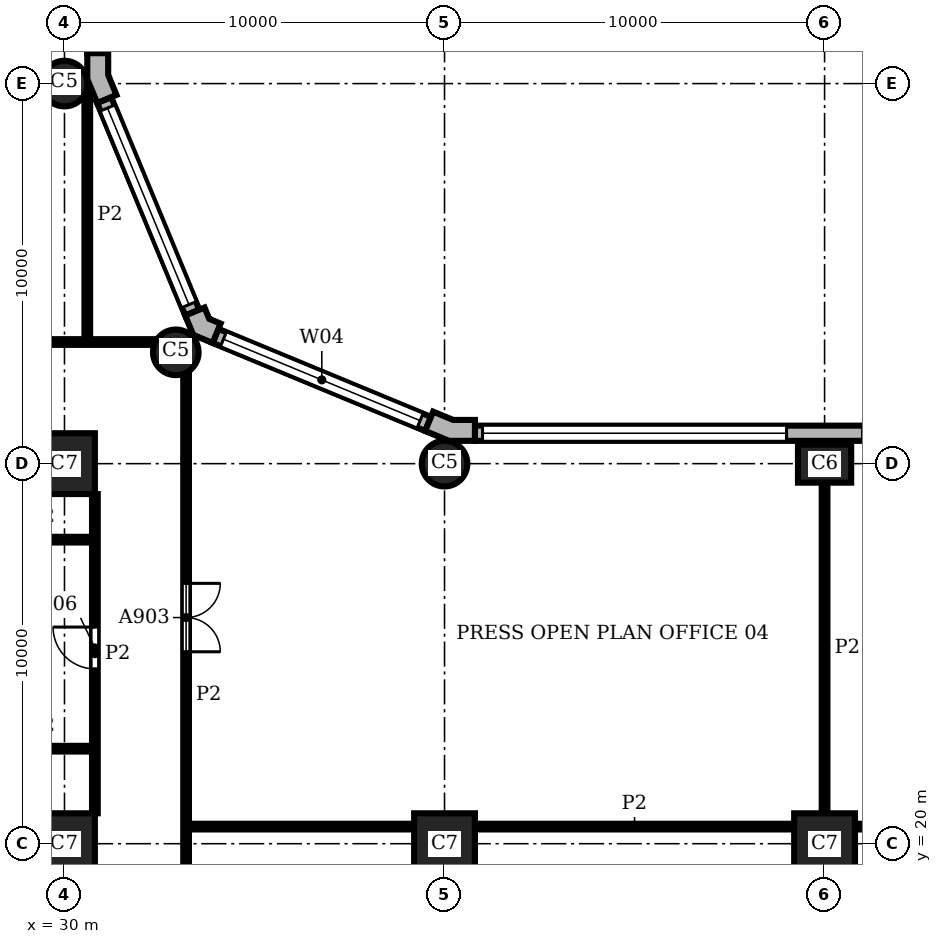
"""IFC4 building model, lengths in metres.
Left out: names, types, materials, properties, quantities, classifications, styles, units other than length and angle.
Written with IfcOpenShell. Run it as: python <this file> out.ifc"""

import sys

from ifc_helpers import new_model, si_unit, direction, frame, frame_2d, origin, origin_2d, place, context, subcontext, project, spatial, polyline, rectangle, circle, outline, extrude, element, fill, save


model = new_model("IFC4")
c1 = context("Model", 3, precision=1e-05, world=origin(), true_north=direction((0.0, 1.0)))
c2 = subcontext(c1, "Body", "Model", "MODEL_VIEW")
j1 = project(units=[si_unit("LENGTHUNIT", "METRE"), si_unit("PLANEANGLEUNIT", "RADIAN")], contexts=[c1])
p1 = place(None, origin())
s1 = spatial("IfcSite", under=j1, at=p1, CompositionType="ELEMENT")
p2 = place(p1, origin())
s2 = spatial("IfcBuilding", under=s1, at=p2, CompositionType="ELEMENT")
p3 = place(p2, frame((0.0, 0.0, 113.4)))
s3 = spatial("IfcBuildingStorey", under=s2, at=p3, CompositionType="ELEMENT", Elevation=113.4)
p4 = place(p3, frame((50.0, 30.0, 0.0), z_axis=(0.0, 0.0, 1.0), x_axis=(1.0, 0.0, 0.0)))
e1 = element("IfcColumn", 1, at=p4, inside=s3, PredefinedType="COLUMN", context=c2, shape_type="SweptSolid", body=[
    extrude(rectangle(XDim=1.4, YDim=1.0, at=origin_2d()), origin(), (0.0, 0.0, 1.0), 3.9),
])
for number, where, z_axis, x_axis in (
    (2, (40.0, 30.0, 0.0), (0.0, 0.0, 1.0), (1.0, 0.0, 0.0)),
    (3, (32.929, 32.929, 0.0), (0.0, 0.0, 1.0), (1.0, 0.0, 0.0)),
    (4, (30.0, 40.0, 0.0), (0.0, 0.0, 1.0), (1.0, 0.0, 0.0)),
):
    element("IfcColumn", number, at=place(p3, frame(where, z_axis=z_axis, x_axis=x_axis)), inside=s3, PredefinedType="COLUMN", context=c2, shape_type="SweptSolid", body=[
        extrude(circle(Radius=0.6, at=origin_2d()), origin(), (0.0, 0.0, 1.0), 3.9),
    ])
for number, where, z_axis, x_axis in (
    (5, (30.0, 20.0, 0.0), (0.0, 0.0, 1.0), (1.0, 0.0, 0.0)),
    (6, (30.0, 30.0, 0.0), (0.0, 0.0, 1.0), (1.0, 0.0, 0.0)),
    (7, (40.0, 20.0, 0.0), (0.0, 0.0, 1.0), (1.0, 0.0, 0.0)),
    (8, (50.0, 20.0, 0.0), (0.0, 0.0, 1.0), (1.0, 0.0, 0.0)),
):
    element("IfcColumn", number, at=place(p3, frame(where, z_axis=z_axis, x_axis=x_axis)), inside=s3, PredefinedType="COLUMN", context=c2, shape_type="SweptSolid", body=[
        extrude(rectangle(XDim=1.6, YDim=1.6, at=origin_2d()), origin(), (0.0, 0.0, 1.0), 3.9),
    ])
p5 = place(p3, origin())
e9 = element("IfcWall", 9, at=p5, inside=s3, PredefinedType="SOLIDWALL", context=c2, shape_type="SweptSolid", body=[
    extrude(outline(polyline([(40.8, 31.0), (40.8, 31.15), (40.229, 31.15), (39.701, 31.369), (39.644, 31.23), (39.49, 30.861), (40.119, 30.6), (40.8, 30.6), (40.8, 31.0)])), origin(), (0.0, 0.0, 1.0), 3.9),
])
e10 = element("IfcWall", 10, at=p5, inside=s3, PredefinedType="SOLIDWALL", context=c2, shape_type="SweptSolid", body=[
    extrude(outline(polyline([(34.051, 33.547), (34.108, 33.685), (33.809, 33.809), (33.685, 34.108), (33.547, 34.051), (33.177, 33.898), (33.388, 33.388), (33.898, 33.177), (34.051, 33.547)])), origin(), (0.0, 0.0, 1.0), 3.9),
])
e11 = element("IfcWall", 11, at=p5, inside=s3, PredefinedType="SOLIDWALL", context=c2, shape_type="SweptSolid", body=[
    extrude(outline(polyline([(31.23, 39.644), (31.369, 39.701), (31.15, 40.229), (31.15, 40.8), (31.0, 40.8), (30.6, 40.8), (30.6, 40.119), (30.861, 39.49), (31.23, 39.644)])), origin(), (0.0, 0.0, 1.0), 3.9),
])
p6 = place(p3, frame((69.2, 30.8, 0.0), z_axis=(0.0, 0.0, 1.0), x_axis=(-1.0, 0.0, 0.0)))
e12 = element("IfcWall", 12, at=p6, inside=s3, PredefinedType="SOLIDWALL", context=c2, shape_type="SweptSolid", body=[
    extrude(rectangle(XDim=28.4, YDim=0.4, at=frame_2d((14.2, 0.0))), origin(), (0.0, 0.0, 1.0), 3.9),
])
p7 = place(p6, frame((0.2, 0.0, 0.9)))
e13 = element("IfcOpeningElement", 13, at=p7, cuts=e12, PredefinedType="OPENING", context=c2, shape_type="SweptSolid", body=[
    extrude(rectangle(XDim=8.0, YDim=2.35, at=frame_2d((4.0, 1.175))), frame((0.0, 0.21, 0.0), z_axis=(0.0, -1.0, 0.0), x_axis=(1.0, 0.0, 0.0)), (0.0, 0.0, 1.0), 0.42),
])
p8 = place(p6, frame((10.2, 0.0, 0.9)))
e14 = element("IfcOpeningElement", 14, at=p8, cuts=e12, PredefinedType="OPENING", context=c2, shape_type="SweptSolid", body=[
    extrude(rectangle(XDim=8.0, YDim=2.35, at=frame_2d((4.0, 1.175))), frame((0.0, 0.21, 0.0), z_axis=(0.0, -1.0, 0.0), x_axis=(1.0, 0.0, 0.0)), (0.0, 0.0, 1.0), 0.42),
])
p9 = place(p6, frame((20.2, 0.0, 0.9)))
e15 = element("IfcOpeningElement", 15, at=p9, cuts=e12, PredefinedType="OPENING", context=c2, shape_type="SweptSolid", body=[
    extrude(rectangle(XDim=8.0, YDim=2.35, at=frame_2d((4.0, 1.175))), frame((0.0, 0.21, 0.0), z_axis=(0.0, -1.0, 0.0), x_axis=(1.0, 0.0, 0.0)), (0.0, 0.0, 1.0), 0.42),
])
p10 = place(p3, frame((39.567, 31.045, 0.0), z_axis=(0.0, 0.0, 1.0), x_axis=(-0.923891000409, 0.382655745237, 0.0)))
e16 = element("IfcWall", 16, at=p10, inside=s3, PredefinedType="SOLIDWALL", context=c2, shape_type="SweptSolid", body=[
    extrude(rectangle(XDim=6.053, YDim=0.4, at=frame_2d((3.027, 0.0))), origin(), (0.0, 0.0, 1.0), 3.9),
])
p11 = place(p10, frame((0.227, 0.0, 0.9)))
e17 = element("IfcOpeningElement", 17, at=p11, cuts=e16, PredefinedType="OPENING", context=c2, shape_type="SweptSolid", body=[
    extrude(rectangle(XDim=5.6, YDim=2.35, at=frame_2d((2.8, 1.175))), frame((0.0, 0.21, 0.0), z_axis=(0.0, -1.0, 0.0), x_axis=(1.0, 0.0, 0.0)), (0.0, 0.0, 1.0), 0.42),
])
p12 = place(p3, frame((33.362, 33.974, 0.0), z_axis=(0.0, 0.0, 1.0), x_axis=(-0.382655745237, 0.923891000409, 0.0)))
e18 = element("IfcWall", 18, at=p12, inside=s3, PredefinedType="SOLIDWALL", context=c2, shape_type="SweptSolid", body=[
    extrude(rectangle(XDim=6.053, YDim=0.4, at=frame_2d((3.027, 0.0))), origin(), (0.0, 0.0, 1.0), 3.9),
])
p13 = place(p12, frame((0.227, 0.0, 0.9)))
e19 = element("IfcOpeningElement", 19, at=p13, cuts=e18, PredefinedType="OPENING", context=c2, shape_type="SweptSolid", body=[
    extrude(rectangle(XDim=5.6, YDim=2.35, at=frame_2d((2.8, 1.175))), frame((0.0, 0.21, 0.0), z_axis=(0.0, -1.0, 0.0), x_axis=(1.0, 0.0, 0.0)), (0.0, 0.0, 1.0), 0.42),
])
p14 = place(p3, frame((30.8, 40.8, 0.0), z_axis=(0.0, 0.0, 1.0), x_axis=(0.0, 1.0, 0.0)))
e20 = element("IfcWall", 20, at=p14, inside=s3, PredefinedType="SOLIDWALL", context=c2, shape_type="SweptSolid", body=[
    extrude(rectangle(XDim=18.4, YDim=0.4, at=frame_2d((9.2, 0.0))), origin(), (0.0, 0.0, 1.0), 3.9),
])
p15 = place(p14, frame((0.2, 0.0, 0.9)))
e21 = element("IfcOpeningElement", 21, at=p15, cuts=e20, PredefinedType="OPENING", context=c2, shape_type="SweptSolid", body=[
    extrude(rectangle(XDim=8.0, YDim=2.35, at=frame_2d((4.0, 1.175))), frame((0.0, 0.21, 0.0), z_axis=(0.0, -1.0, 0.0), x_axis=(1.0, 0.0, 0.0)), (0.0, 0.0, 1.0), 0.42),
])
p16 = place(p14, frame((10.2, 0.0, 0.9)))
e22 = element("IfcOpeningElement", 22, at=p16, cuts=e20, PredefinedType="OPENING", context=c2, shape_type="SweptSolid", body=[
    extrude(rectangle(XDim=8.0, YDim=2.35, at=frame_2d((4.0, 1.175))), frame((0.0, 0.21, 0.0), z_axis=(0.0, -1.0, 0.0), x_axis=(1.0, 0.0, 0.0)), (0.0, 0.0, 1.0), 0.42),
])
p17 = place(p3, frame((30.6, 33.2, 0.0), z_axis=(0.0, 0.0, 1.0), x_axis=(0.0, 1.0, 0.0)))
e23 = element("IfcWall", 23, at=p17, inside=s3, PredefinedType="PARTITIONING", context=c2, shape_type="SweptSolid", body=[
    extrude(rectangle(XDim=6.699, YDim=0.15, at=frame_2d((3.35, 0.0))), origin(), (0.0, 0.0, 1.0), 3.45),
])
p18 = place(p3, frame((30.8, 20.8, 0.0), z_axis=(0.0, 0.0, 1.0), x_axis=(0.0, 1.0, 0.0)))
e24 = element("IfcWall", 24, at=p18, inside=s3, PredefinedType="PARTITIONING", context=c2, shape_type="SweptSolid", body=[
    extrude(rectangle(XDim=8.4, YDim=0.15, at=frame_2d((4.2, 0.0))), origin(), (0.0, 0.0, 1.0), 3.45),
])
p19 = place(p18, frame((3.8, 0.0, 0.0)))
e25 = element("IfcOpeningElement", 25, at=p19, cuts=e24, PredefinedType="OPENING", context=c2, shape_type="SweptSolid", body=[
    extrude(rectangle(XDim=1.1, YDim=2.1, at=frame_2d((0.55, 1.05))), frame((0.0, 0.085, 0.0), z_axis=(0.0, -1.0, 0.0), x_axis=(1.0, 0.0, 0.0)), (0.0, 0.0, 1.0), 0.17),
])
p20 = place(p3, frame((33.2, 15.45, 0.0), z_axis=(0.0, 0.0, 1.0), x_axis=(0.0, 1.0, 0.0)))
e26 = element("IfcWall", 26, at=p20, inside=s3, PredefinedType="PARTITIONING", context=c2, shape_type="SweptSolid", body=[
    extrude(rectangle(XDim=16.912, YDim=0.15, at=frame_2d((8.456, 0.0))), origin(), (0.0, 0.0, 1.0), 3.45),
])
p21 = place(p20, frame((9.6, 0.0, 0.0)))
e27 = element("IfcOpeningElement", 27, at=p21, cuts=e26, PredefinedType="OPENING", context=c2, shape_type="SweptSolid", body=[
    extrude(rectangle(XDim=1.8, YDim=2.1, at=frame_2d((0.9, 1.05))), frame((0.0, 0.085, 0.0), z_axis=(0.0, -1.0, 0.0), x_axis=(1.0, 0.0, 0.0)), (0.0, 0.0, 1.0), 0.17),
])
p22 = place(p3, frame((50.0, 20.8, 0.0), z_axis=(0.0, 0.0, 1.0), x_axis=(0.0, 1.0, 0.0)))
e28 = element("IfcWall", 28, at=p22, inside=s3, PredefinedType="PARTITIONING", context=c2, shape_type="SweptSolid", body=[
    extrude(rectangle(XDim=8.7, YDim=0.15, at=frame_2d((4.35, 0.0))), origin(), (0.0, 0.0, 1.0), 3.45),
])
p23 = place(p3, frame((33.2, 20.45, 0.0), z_axis=(0.0, 0.0, 1.0), x_axis=(1.0, 0.0, 0.0)))
e29 = element("IfcWall", 29, at=p23, inside=s3, PredefinedType="PARTITIONING", context=c2, shape_type="SweptSolid", body=[
    extrude(rectangle(XDim=6.0, YDim=0.15, at=frame_2d((3.0, 0.0))), origin(), (0.0, 0.0, 1.0), 3.45),
])
p24 = place(p3, frame((40.8, 20.45, 0.0), z_axis=(0.0, 0.0, 1.0), x_axis=(1.0, 0.0, 0.0)))
e30 = element("IfcWall", 30, at=p24, inside=s3, PredefinedType="PARTITIONING", context=c2, shape_type="SweptSolid", body=[
    extrude(rectangle(XDim=8.4, YDim=0.15, at=frame_2d((4.2, 0.0))), origin(), (0.0, 0.0, 1.0), 3.45),
])
p25 = place(p3, frame((50.8, 20.45, 0.0), z_axis=(0.0, 0.0, 1.0), x_axis=(1.0, 0.0, 0.0)))
e31 = element("IfcWall", 31, at=p25, inside=s3, PredefinedType="PARTITIONING", context=c2, shape_type="SweptSolid", body=[
    extrude(rectangle(XDim=4.2, YDim=0.15, at=frame_2d((2.1, 0.0))), origin(), (0.0, 0.0, 1.0), 3.45),
])
for number, where, z_axis, x_axis in (
    (32, (28.0, 22.5, 0.0), (0.0, 0.0, 1.0), (1.0, 0.0, 0.0)),
    (33, (28.0, 28.0, 0.0), (0.0, 0.0, 1.0), (1.0, 0.0, 0.0)),
):
    element("IfcWall", number, at=place(p3, frame(where, z_axis=z_axis, x_axis=x_axis)), inside=s3, PredefinedType="PARTITIONING", context=c2, shape_type="SweptSolid", body=[
        extrude(rectangle(XDim=2.8, YDim=0.15, at=frame_2d((1.4, 0.0))), origin(), (0.0, 0.0, 1.0), 3.45),
    ])
p26 = place(p3, frame((16.5, 33.2, 0.0), z_axis=(0.0, 0.0, 1.0), x_axis=(1.0, 0.0, 0.0)))
e34 = element("IfcWall", 34, at=p26, inside=s3, PredefinedType="PARTITIONING", context=c2, shape_type="SweptSolid", body=[
    extrude(rectangle(XDim=15.862, YDim=0.15, at=frame_2d((7.931, 0.0))), origin(), (0.0, 0.0, 1.0), 3.45),
])
p27 = place(p26, frame((10.05, 0.0, 0.0)))
e35 = element("IfcOpeningElement", 35, at=p27, cuts=e34, PredefinedType="OPENING", context=c2, shape_type="SweptSolid", body=[
    extrude(rectangle(XDim=1.8, YDim=2.1, at=frame_2d((0.9, 1.05))), frame((0.0, 0.085, 0.0), z_axis=(0.0, -1.0, 0.0), x_axis=(1.0, 0.0, 0.0)), (0.0, 0.0, 1.0), 0.17),
])
p28 = place(p9, origin())
e36 = element("IfcWindow", 36, at=p28, inside=s3, PartitioningType="SINGLE_PANEL", PredefinedType="WINDOW", context=c2, shape_type="SweptSolid", body=[
    extrude(rectangle(XDim=8.0, YDim=2.35, at=frame_2d((4.0, 1.175))), frame((0.0, 0.16, 0.0), z_axis=(0.0, -1.0, 0.0), x_axis=(1.0, 0.0, 0.0)), (0.0, 0.0, 1.0), 0.06),
])
fill(e15, e36)
p29 = place(p11, origin())
e37 = element("IfcWindow", 37, at=p29, inside=s3, PartitioningType="SINGLE_PANEL", PredefinedType="WINDOW", context=c2, shape_type="SweptSolid", body=[
    extrude(rectangle(XDim=5.6, YDim=2.35, at=frame_2d((2.8, 1.175))), frame((0.0, 0.16, 0.0), z_axis=(0.0, -1.0, 0.0), x_axis=(1.0, 0.0, 0.0)), (0.0, 0.0, 1.0), 0.06),
])
fill(e17, e37)
p30 = place(p13, origin())
e38 = element("IfcWindow", 38, at=p30, inside=s3, PartitioningType="SINGLE_PANEL", PredefinedType="WINDOW", context=c2, shape_type="SweptSolid", body=[
    extrude(rectangle(XDim=5.6, YDim=2.35, at=frame_2d((2.8, 1.175))), frame((0.0, 0.16, 0.0), z_axis=(0.0, -1.0, 0.0), x_axis=(1.0, 0.0, 0.0)), (0.0, 0.0, 1.0), 0.06),
])
fill(e19, e38)
p31 = place(p21, frame((1.8, 0.0, 0.0), z_axis=(0.0, 0.0, 1.0), x_axis=(-1.0, 0.0, 0.0)))
e39 = element("IfcDoor", 39, at=p31, inside=s3, OperationType="DOUBLE_DOOR_SINGLE_SWING", PredefinedType="DOOR", context=c2, shape_type="SweptSolid", body=[
    extrude(rectangle(XDim=1.8, YDim=2.1, at=frame_2d((0.9, 1.05))), frame((0.0, 0.025, 0.0), z_axis=(0.0, -1.0, 0.0), x_axis=(1.0, 0.0, 0.0)), (0.0, 0.0, 1.0), 0.05),
])
fill(e27, e39)
p32 = place(p19, origin())
e40 = element("IfcDoor", 40, at=p32, inside=s3, OperationType="SINGLE_SWING_RIGHT", PredefinedType="DOOR", context=c2, shape_type="SweptSolid", body=[
    extrude(rectangle(XDim=1.1, YDim=2.1, at=frame_2d((0.55, 1.05))), frame((0.0, 0.025, 0.0), z_axis=(0.0, -1.0, 0.0), x_axis=(1.0, 0.0, 0.0)), (0.0, 0.0, 1.0), 0.05),
])
fill(e25, e40)
save(model, sys.argv[1])
